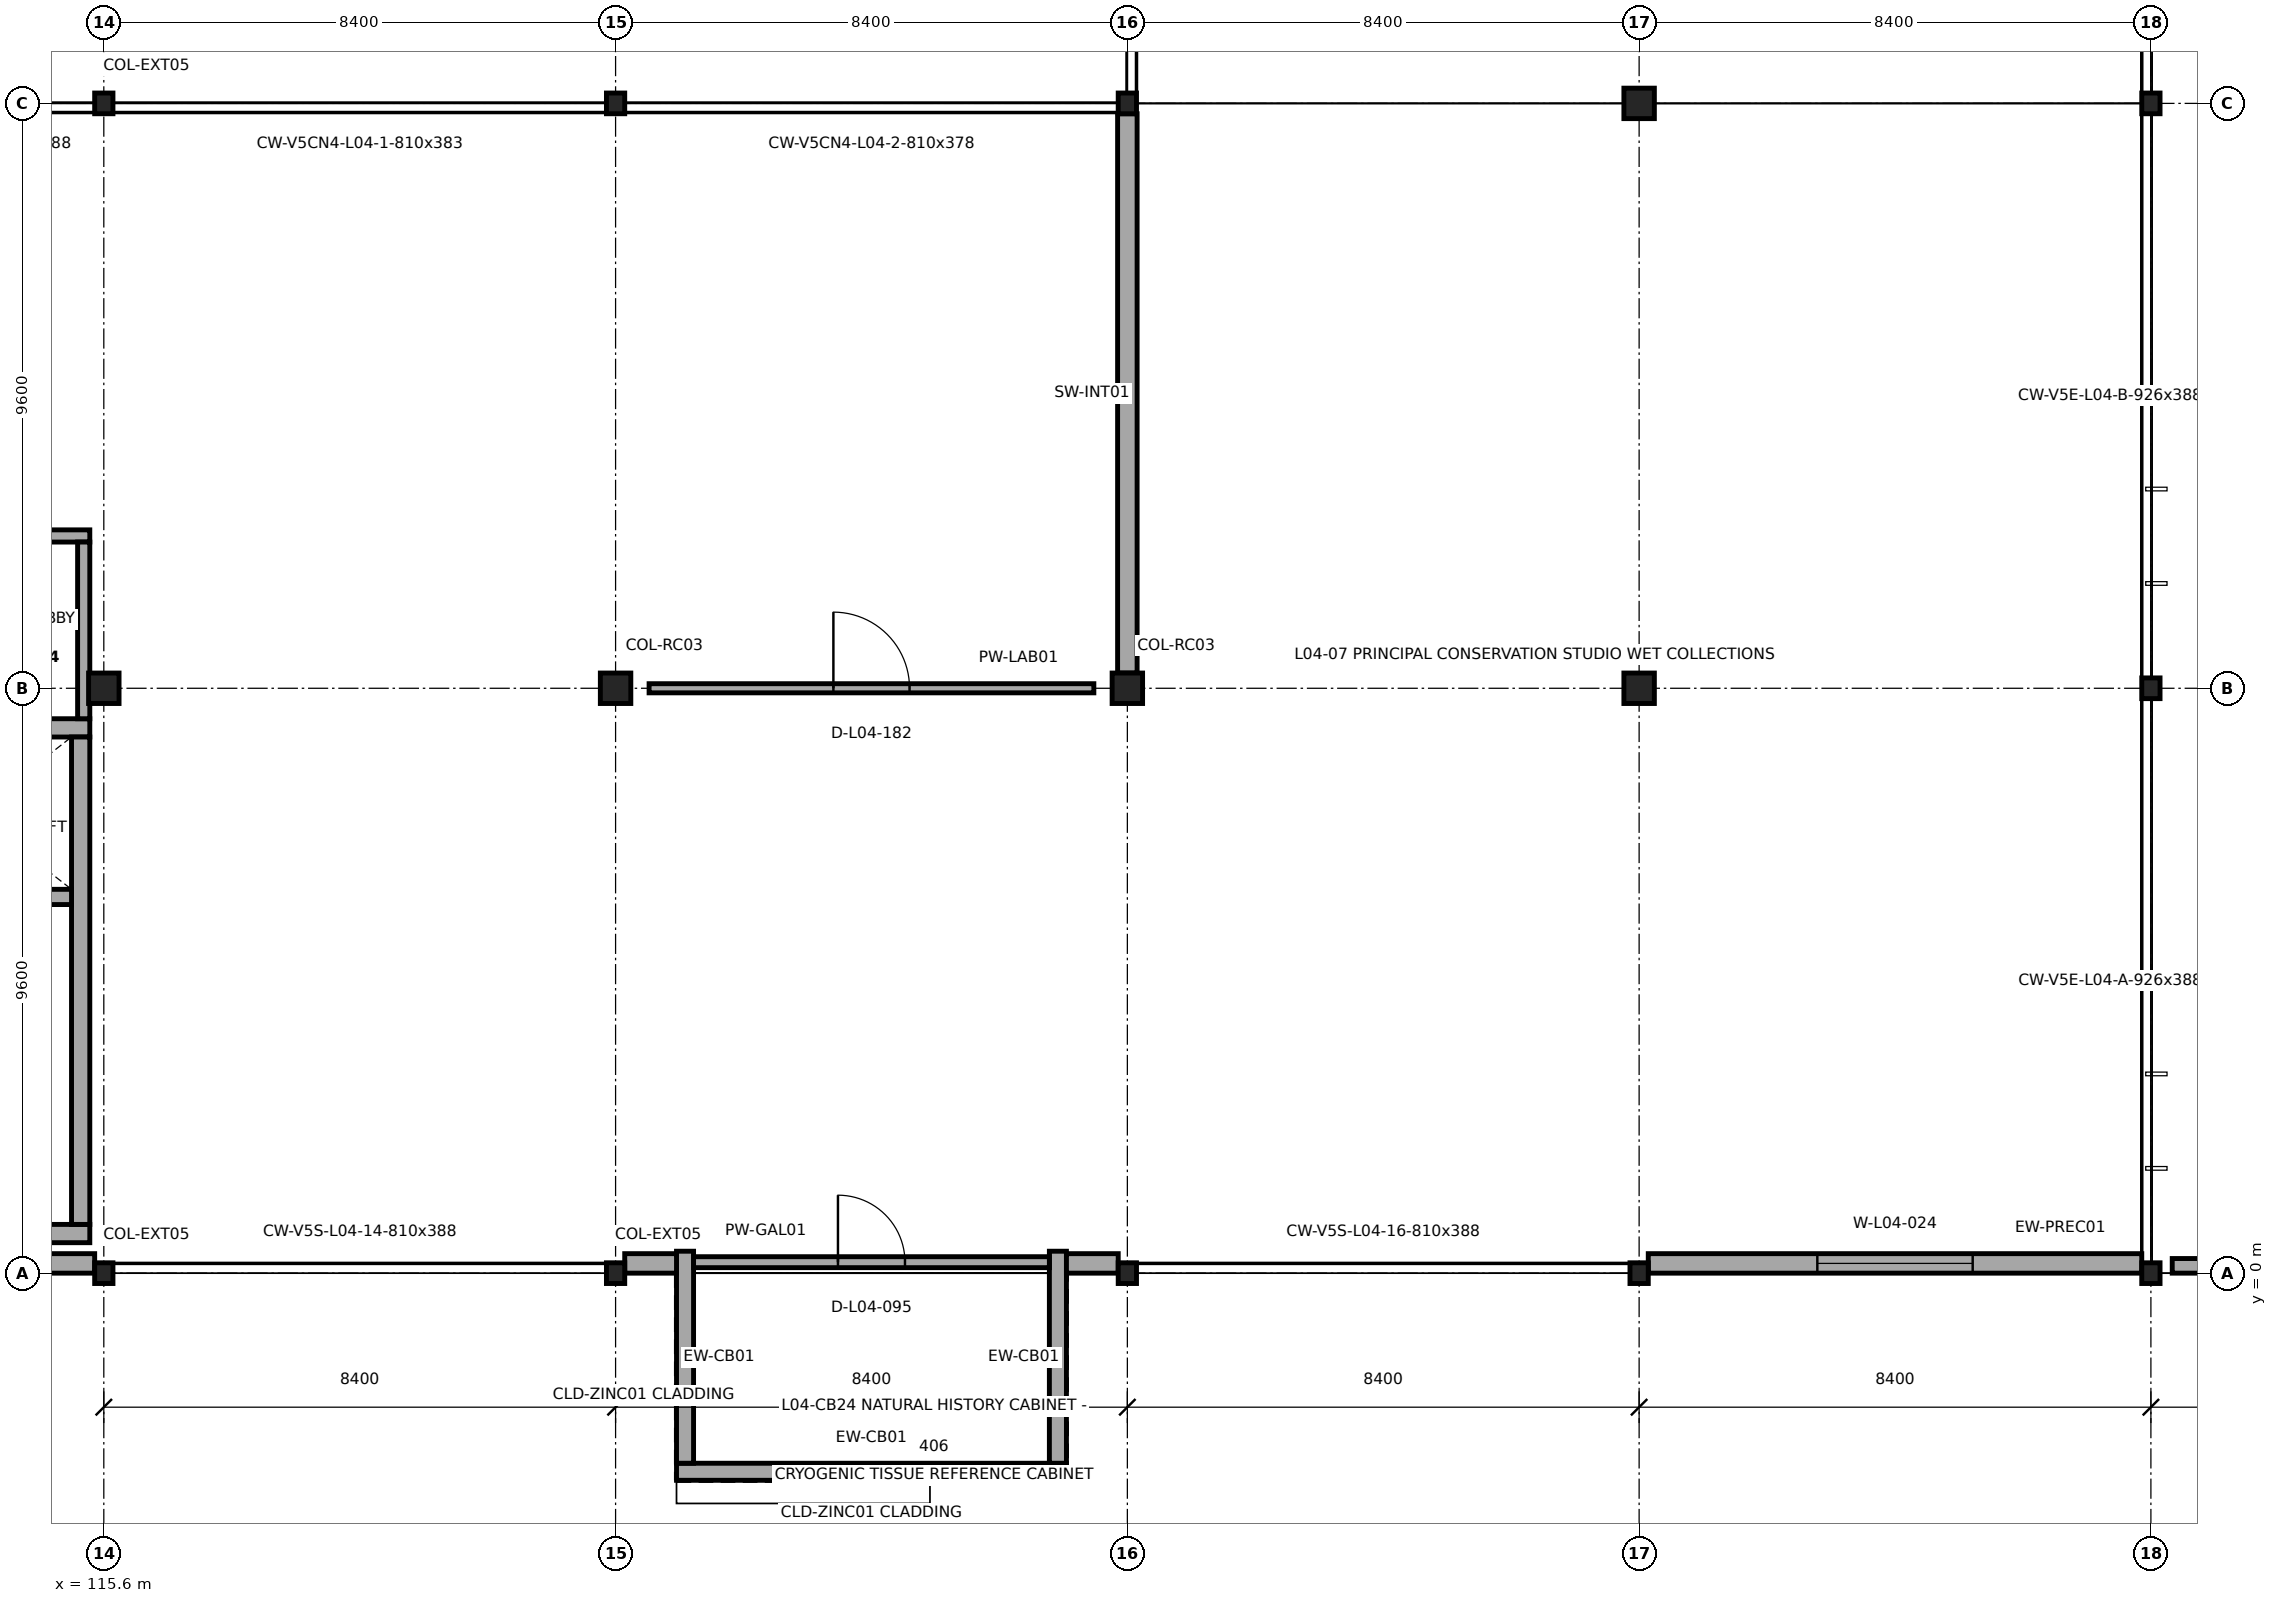
"""IFC4 building model, lengths in metres.
Left out: names, types, materials, properties, quantities, classifications, styles, units other than length and angle.
Written with IfcOpenShell. Run it as: python <this file> out.ifc"""

import sys

from ifc_helpers import new_model, si_unit, direction, frame, frame_2d, origin, origin_2d, place, context, subcontext, project, spatial, rectangle, i_section, extrude, element, fill, save


model = new_model("IFC4")
c1 = context("Model", 3, precision=1e-05, world=origin(), true_north=direction((0.0, 1.0)))
c2 = subcontext(c1, "Body", "Model", "MODEL_VIEW")
j1 = project(units=[si_unit("LENGTHUNIT", "METRE"), si_unit("PLANEANGLEUNIT", "RADIAN")], contexts=[c1])
p1 = place(None, origin())
s1 = spatial("IfcSite", under=j1, at=p1, CompositionType="ELEMENT")
p2 = place(p1, origin())
s2 = spatial("IfcBuilding", under=s1, at=p2, CompositionType="ELEMENT")
p3 = place(p2, frame((0.0, 0.0, 21.9)))
s3 = spatial("IfcBuildingStorey", under=s2, at=p3, CompositionType="ELEMENT", Elevation=21.9)
p4 = place(p3, frame((115.6, 0.0, 0.0), z_axis=(0.0, 0.0, 1.0), x_axis=(1.0, 0.0, 0.0)))
e1 = element("IfcColumn", 1, at=p4, inside=s3, PredefinedType="COLUMN", context=c2, shape_type="SweptSolid", body=[
    extrude(i_section(OverallWidth=0.3, OverallDepth=0.34, WebThickness=0.012, FlangeThickness=0.021, FilletRadius=0.027, at=origin_2d()), origin(), (0.0, 0.0, 1.0), 4.5),
])
p5 = place(p3, frame((115.6, 9.6, 0.0), z_axis=(0.0, 0.0, 1.0), x_axis=(1.0, 0.0, 0.0)))
e2 = element("IfcColumn", 2, at=p5, inside=s3, PredefinedType="COLUMN", context=c2, shape_type="SweptSolid", body=[
    extrude(rectangle(XDim=0.5, YDim=0.5, at=origin_2d()), origin(), (0.0, 0.0, 1.0), 4.5),
])
for number, where, z_axis, x_axis in (
    (3, (115.6, 19.2, 0.0), (0.0, 0.0, 1.0), (1.0, 0.0, 0.0)),
    (4, (124.0, 0.0, 0.0), (0.0, 0.0, 1.0), (1.0, 0.0, 0.0)),
):
    element("IfcColumn", number, at=place(p3, frame(where, z_axis=z_axis, x_axis=x_axis)), inside=s3, PredefinedType="COLUMN", context=c2, shape_type="SweptSolid", body=[
        extrude(i_section(OverallWidth=0.3, OverallDepth=0.34, WebThickness=0.012, FlangeThickness=0.021, FilletRadius=0.027, at=origin_2d()), origin(), (0.0, 0.0, 1.0), 4.5),
    ])
p6 = place(p3, frame((124.0, 9.6, 0.0), z_axis=(0.0, 0.0, 1.0), x_axis=(1.0, 0.0, 0.0)))
e5 = element("IfcColumn", 5, at=p6, inside=s3, PredefinedType="COLUMN", context=c2, shape_type="SweptSolid", body=[
    extrude(rectangle(XDim=0.5, YDim=0.5, at=origin_2d()), origin(), (0.0, 0.0, 1.0), 4.5),
])
for number, where, z_axis, x_axis in (
    (6, (124.0, 19.2, 0.0), (0.0, 0.0, 1.0), (1.0, 0.0, 0.0)),
    (7, (132.4, 0.0, 0.0), (0.0, 0.0, 1.0), (1.0, 0.0, 0.0)),
):
    element("IfcColumn", number, at=place(p3, frame(where, z_axis=z_axis, x_axis=x_axis)), inside=s3, PredefinedType="COLUMN", context=c2, shape_type="SweptSolid", body=[
        extrude(i_section(OverallWidth=0.3, OverallDepth=0.34, WebThickness=0.012, FlangeThickness=0.021, FilletRadius=0.027, at=origin_2d()), origin(), (0.0, 0.0, 1.0), 4.5),
    ])
p7 = place(p3, frame((132.4, 9.6, 0.0), z_axis=(0.0, 0.0, 1.0), x_axis=(1.0, 0.0, 0.0)))
e8 = element("IfcColumn", 8, at=p7, inside=s3, PredefinedType="COLUMN", context=c2, shape_type="SweptSolid", body=[
    extrude(rectangle(XDim=0.5, YDim=0.5, at=origin_2d()), origin(), (0.0, 0.0, 1.0), 4.5),
])
for number, where, z_axis, x_axis in (
    (9, (132.4, 19.2, 0.0), (0.0, 0.0, 1.0), (1.0, 0.0, 0.0)),
    (10, (140.8, 0.0, 0.0), (0.0, 0.0, 1.0), (1.0, 0.0, 0.0)),
):
    element("IfcColumn", number, at=place(p3, frame(where, z_axis=z_axis, x_axis=x_axis)), inside=s3, PredefinedType="COLUMN", context=c2, shape_type="SweptSolid", body=[
        extrude(i_section(OverallWidth=0.3, OverallDepth=0.34, WebThickness=0.012, FlangeThickness=0.021, FilletRadius=0.027, at=origin_2d()), origin(), (0.0, 0.0, 1.0), 4.5),
    ])
for number, where, z_axis, x_axis in (
    (11, (140.8, 9.6, 0.0), (0.0, 0.0, 1.0), (1.0, 0.0, 0.0)),
    (12, (140.8, 19.2, 0.0), (0.0, 0.0, 1.0), (1.0, 0.0, 0.0)),
):
    element("IfcColumn", number, at=place(p3, frame(where, z_axis=z_axis, x_axis=x_axis)), inside=s3, PredefinedType="COLUMN", context=c2, shape_type="SweptSolid", body=[
        extrude(rectangle(XDim=0.5, YDim=0.5, at=origin_2d()), origin(), (0.0, 0.0, 1.0), 4.5),
    ])
for number, where, z_axis, x_axis in (
    (13, (149.2, 0.0, 0.0), (0.0, 0.0, 1.0), (1.0, 0.0, 0.0)),
    (14, (149.2, 9.6, 0.0), (0.0, 0.0, 1.0), (1.0, 0.0, 0.0)),
    (15, (149.2, 19.2, 0.0), (0.0, 0.0, 1.0), (1.0, 0.0, 0.0)),
):
    element("IfcColumn", number, at=place(p3, frame(where, z_axis=z_axis, x_axis=x_axis)), inside=s3, PredefinedType="COLUMN", context=c2, shape_type="SweptSolid", body=[
        extrude(i_section(OverallWidth=0.3, OverallDepth=0.34, WebThickness=0.012, FlangeThickness=0.021, FilletRadius=0.027, at=origin_2d()), origin(), (0.0, 0.0, 1.0), 4.5),
    ])
p8 = place(p3, frame((125.0, -3.26, 0.0), z_axis=(0.0, 0.0, 1.0), x_axis=(1.0, 0.0, 0.0)))
e16 = element("IfcWall", 16, at=p8, inside=s3, PredefinedType="SOLIDWALL", context=c2, shape_type="SweptSolid", body=[
    extrude(rectangle(XDim=6.4, YDim=0.28, at=frame_2d((3.2, 0.0))), origin(), (0.0, 0.0, 1.0), 2.99),
])
for number, where, z_axis, x_axis in (
    (17, (125.14, 0.36, 0.0), (0.0, 0.0, 1.0), (0.0, -1.0, 0.0)),
    (18, (131.26, -3.12, 0.0), (0.0, 0.0, 1.0), (0.0, 1.0, 0.0)),
):
    element("IfcWall", number, at=place(p3, frame(where, z_axis=z_axis, x_axis=x_axis)), inside=s3, PredefinedType="SOLIDWALL", context=c2, shape_type="SweptSolid", body=[
        extrude(rectangle(XDim=3.48, YDim=0.28, at=frame_2d((1.74, 0.0))), origin(), (0.0, 0.0, 1.0), 2.99),
    ])
p9 = place(p3, frame((107.625, 0.16, 0.0), z_axis=(0.0, 0.0, 1.0), x_axis=(1.0, 0.0, 0.0)))
e19 = element("IfcWall", 19, at=p9, inside=s3, PredefinedType="SOLIDWALL", context=c2, shape_type="SweptSolid", body=[
    extrude(rectangle(XDim=7.825, YDim=0.32, at=frame_2d((3.913, 0.0))), origin(), (0.0, 0.0, 1.0), 3.02),
])
for number, where, z_axis, x_axis in (
    (20, (124.15, 0.16, 0.0), (0.0, 0.0, 1.0), (1.0, 0.0, 0.0)),
    (21, (131.4, 0.16, 0.0), (0.0, 0.0, 1.0), (1.0, 0.0, 0.0)),
):
    element("IfcWall", number, at=place(p3, frame(where, z_axis=z_axis, x_axis=x_axis)), inside=s3, PredefinedType="SOLIDWALL", context=c2, shape_type="SweptSolid", body=[
        extrude(rectangle(XDim=0.85, YDim=0.32, at=frame_2d((0.425, 0.0))), origin(), (0.0, 0.0, 1.0), 3.88),
    ])
p10 = place(p3, frame((140.95, 0.16, 0.0), z_axis=(0.0, 0.0, 1.0), x_axis=(1.0, 0.0, 0.0)))
e22 = element("IfcWall", 22, at=p10, inside=s3, PredefinedType="SOLIDWALL", context=c2, shape_type="SweptSolid", body=[
    extrude(rectangle(XDim=8.1, YDim=0.32, at=frame_2d((4.05, 0.0))), origin(), (0.0, 0.0, 1.0), 3.88),
])
p11 = place(p10, frame((2.775, 0.0, 1.0)))
e23 = element("IfcOpeningElement", 23, at=p11, cuts=e22, PredefinedType="OPENING", context=c2, shape_type="SweptSolid", body=[
    extrude(rectangle(XDim=2.55, YDim=2.35, at=frame_2d((1.275, 1.175))), frame((0.0, 0.17, 0.0), z_axis=(0.0, -1.0, 0.0), x_axis=(1.0, 0.0, 0.0)), (0.0, 0.0, 1.0), 0.34),
])
p12 = place(p3, frame((149.55, 0.12, 0.0), z_axis=(0.0, 0.0, 1.0), x_axis=(1.0, 0.0, 0.0)))
e24 = element("IfcWall", 24, at=p12, inside=s3, PredefinedType="PARAPET", context=c2, shape_type="SweptSolid", body=[
    extrude(rectangle(XDim=7.93, YDim=0.24, at=frame_2d((3.965, 0.0))), origin(), (0.0, 0.0, 1.0), 0.95),
])
p13 = place(p3, frame((107.43, 0.65, 0.0), z_axis=(0.0, 0.0, 1.0), x_axis=(1.0, 0.0, 0.0)))
e25 = element("IfcWall", 25, at=p13, inside=s3, PredefinedType="SHEAR", context=c2, shape_type="SweptSolid", body=[
    extrude(rectangle(XDim=7.94, YDim=0.3, at=frame_2d((3.97, 0.0))), origin(), (0.0, 0.0, 1.0), 4.25),
])
p14 = place(p3, frame((115.37, 8.95, 0.0), z_axis=(0.0, 0.0, 1.0), x_axis=(-1.0, 0.0, 0.0)))
e26 = element("IfcWall", 26, at=p14, inside=s3, PredefinedType="SHEAR", context=c2, shape_type="SweptSolid", body=[
    extrude(rectangle(XDim=7.94, YDim=0.3, at=frame_2d((3.97, 0.0))), origin(), (0.0, 0.0, 1.0), 4.25),
])
p15 = place(p14, frame((5.17, 0.0, 0.0)))
e27 = element("IfcOpeningElement", 27, at=p15, cuts=e26, PredefinedType="OPENING", context=c2, shape_type="SweptSolid", body=[
    extrude(rectangle(XDim=1.1, YDim=2.2, at=frame_2d((0.55, 1.1))), frame((0.0, 0.16, 0.0), z_axis=(0.0, -1.0, 0.0), x_axis=(1.0, 0.0, 0.0)), (0.0, 0.0, 1.0), 0.32),
])
p16 = place(p14, frame((1.35, 0.0, 0.0)))
e28 = element("IfcOpeningElement", 28, at=p16, cuts=e26, PredefinedType="OPENING", context=c2, shape_type="SweptSolid", body=[
    extrude(rectangle(XDim=1.1, YDim=2.1, at=frame_2d((0.55, 1.05))), frame((0.0, 0.16, 0.0), z_axis=(0.0, -1.0, 0.0), x_axis=(1.0, 0.0, 0.0)), (0.0, 0.0, 1.0), 0.32),
])
p17 = place(p3, frame((115.22, 0.8, 0.0), z_axis=(0.0, 0.0, 1.0), x_axis=(0.0, 1.0, 0.0)))
e29 = element("IfcWall", 29, at=p17, inside=s3, PredefinedType="SHEAR", context=c2, shape_type="SweptSolid", body=[
    extrude(rectangle(XDim=8.0, YDim=0.3, at=frame_2d((4.0, 0.0))), origin(), (0.0, 0.0, 1.0), 4.25),
])
p18 = place(p3, frame((111.87, 6.175, 0.0), z_axis=(0.0, 0.0, 1.0), x_axis=(1.0, 0.0, 0.0)))
e30 = element("IfcWall", 30, at=p18, inside=s3, PredefinedType="SHEAR", context=c2, shape_type="SweptSolid", body=[
    extrude(rectangle(XDim=3.2, YDim=0.25, at=frame_2d((1.6, 0.0))), origin(), (0.0, 0.0, 1.0), 4.25),
])
p19 = place(p3, frame((107.43, 12.1, 0.0), z_axis=(0.0, 0.0, 1.0), x_axis=(1.0, 0.0, 0.0)))
e31 = element("IfcWall", 31, at=p19, inside=s3, PredefinedType="SOLIDWALL", context=c2, shape_type="SweptSolid", body=[
    extrude(rectangle(XDim=7.94, YDim=0.2, at=frame_2d((3.97, 0.0))), origin(), (0.0, 0.0, 1.0), 3.672),
])
p20 = place(p19, frame((3.07, 0.0, 0.0)))
e32 = element("IfcOpeningElement", 32, at=p20, cuts=e31, PredefinedType="OPENING", context=c2, shape_type="SweptSolid", body=[
    extrude(rectangle(XDim=1.8, YDim=2.2, at=frame_2d((0.9, 1.1))), frame((0.0, 0.11, 0.0), z_axis=(0.0, -1.0, 0.0), x_axis=(1.0, 0.0, 0.0)), (0.0, 0.0, 1.0), 0.22),
])
p21 = place(p3, frame((115.27, 12.0, 0.0), z_axis=(0.0, 0.0, 1.0), x_axis=(0.0, -1.0, 0.0)))
e33 = element("IfcWall", 33, at=p21, inside=s3, PredefinedType="SOLIDWALL", context=c2, shape_type="SweptSolid", body=[
    extrude(rectangle(XDim=2.9, YDim=0.2, at=frame_2d((1.45, 0.0))), origin(), (0.0, 0.0, 1.0), 3.772),
])
p22 = place(p3, frame((132.4, 9.85, 0.0), z_axis=(0.0, 0.0, 1.0), x_axis=(0.0, 1.0, 0.0)))
e34 = element("IfcWall", 34, at=p22, inside=s3, PredefinedType="SHEAR", context=c2, shape_type="SweptSolid", body=[
    extrude(rectangle(XDim=9.18, YDim=0.32, at=frame_2d((4.59, 0.0))), origin(), (0.0, 0.0, 1.0), 4.25),
])
p23 = place(p3, frame((125.28, 0.18, 0.0), z_axis=(0.0, 0.0, 1.0), x_axis=(1.0, 0.0, 0.0)))
e35 = element("IfcWall", 35, at=p23, inside=s3, PredefinedType="PARTITIONING", context=c2, shape_type="SweptSolid", body=[
    extrude(rectangle(XDim=5.84, YDim=0.18, at=frame_2d((2.92, 0.0))), origin(), (0.0, 0.0, 1.0), 2.99),
])
p24 = place(p23, frame((2.37, 0.0, 0.0)))
e36 = element("IfcOpeningElement", 36, at=p24, cuts=e35, PredefinedType="OPENING", context=c2, shape_type="SweptSolid", body=[
    extrude(rectangle(XDim=1.1, YDim=2.2, at=frame_2d((0.55, 1.1))), frame((0.0, 0.1, 0.0), z_axis=(0.0, -1.0, 0.0), x_axis=(1.0, 0.0, 0.0)), (0.0, 0.0, 1.0), 0.2),
])
p25 = place(p3, frame((124.55, 9.6, 0.0), z_axis=(0.0, 0.0, 1.0), x_axis=(1.0, 0.0, 0.0)))
e37 = element("IfcWall", 37, at=p25, inside=s3, PredefinedType="PARTITIONING", context=c2, shape_type="SweptSolid", body=[
    extrude(rectangle(XDim=7.3, YDim=0.15, at=frame_2d((3.65, 0.0))), origin(), (0.0, 0.0, 1.0), 2.992),
])
p26 = place(p25, frame((3.025, 0.0, 0.0)))
e38 = element("IfcOpeningElement", 38, at=p26, cuts=e37, PredefinedType="OPENING", context=c2, shape_type="SweptSolid", body=[
    extrude(rectangle(XDim=1.25, YDim=2.2, at=frame_2d((0.625, 1.1))), frame((0.0, 0.085, 0.0), z_axis=(0.0, -1.0, 0.0), x_axis=(1.0, 0.0, 0.0)), (0.0, 0.0, 1.0), 0.17),
])
p27 = place(p11, origin())
e39 = element("IfcWindow", 39, at=p27, inside=s3, PartitioningType="SINGLE_PANEL", PredefinedType="WINDOW", context=c2, shape_type="SweptSolid", body=[
    extrude(rectangle(XDim=2.55, YDim=2.35, at=frame_2d((1.275, 1.175))), frame((0.0, 0.03, 0.0), z_axis=(0.0, -1.0, 0.0), x_axis=(1.0, 0.0, 0.0)), (0.0, 0.0, 1.0), 0.06),
])
fill(e23, e39)
p28 = place(p24, origin())
e40 = element("IfcDoor", 40, at=p28, inside=s3, OperationType="SINGLE_SWING_LEFT", PredefinedType="DOOR", context=c2, shape_type="SweptSolid", body=[
    extrude(rectangle(XDim=1.1, YDim=2.2, at=frame_2d((0.55, 1.1))), frame((0.0, 0.025, 0.0), z_axis=(0.0, -1.0, 0.0), x_axis=(1.0, 0.0, 0.0)), (0.0, 0.0, 1.0), 0.05),
])
fill(e36, e40)
p29 = place(p26, origin())
e41 = element("IfcDoor", 41, at=p29, inside=s3, OperationType="SINGLE_SWING_LEFT", PredefinedType="DOOR", context=c2, shape_type="SweptSolid", body=[
    extrude(rectangle(XDim=1.25, YDim=2.2, at=frame_2d((0.625, 1.1))), frame((0.0, 0.025, 0.0), z_axis=(0.0, -1.0, 0.0), x_axis=(1.0, 0.0, 0.0)), (0.0, 0.0, 1.0), 0.05),
])
fill(e38, e41)
save(model, sys.argv[1])
